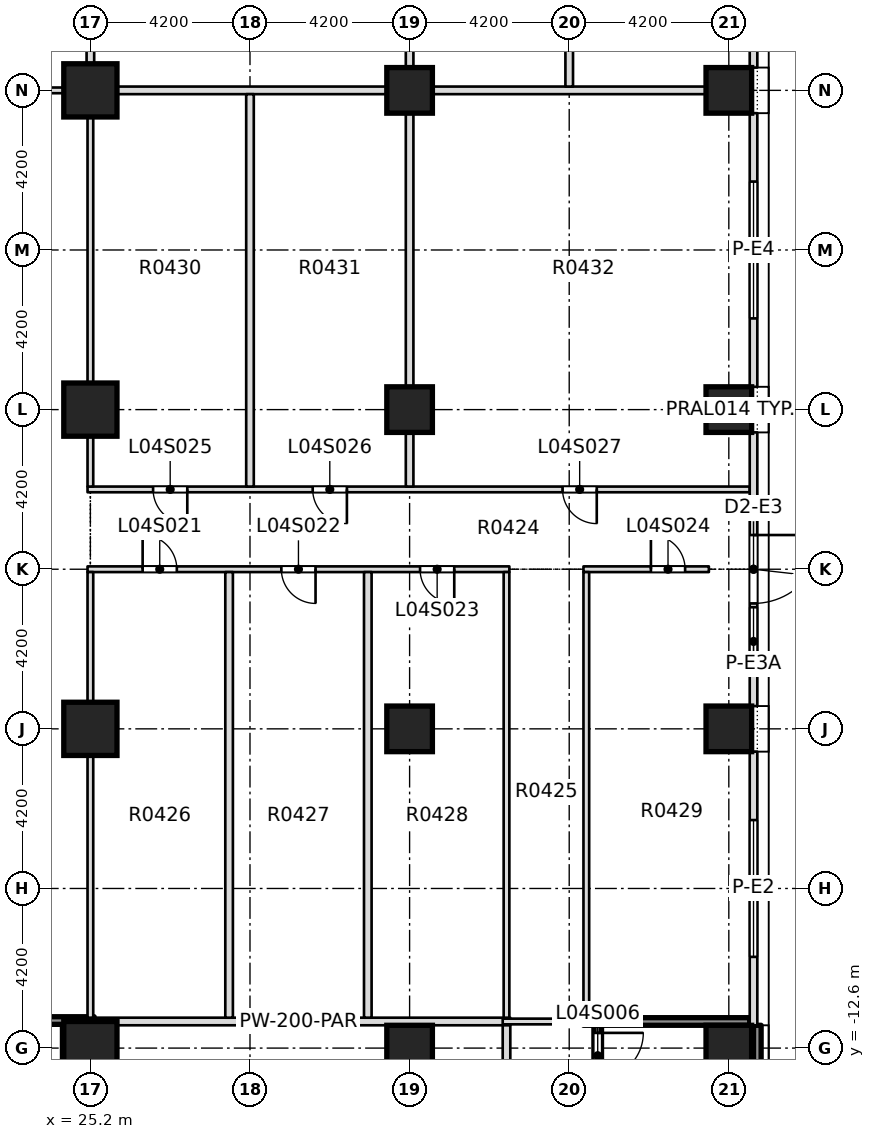
"""IFC4 building model, lengths in metres.
Left out: names, types, materials, properties, quantities, classifications, styles, units other than length and angle.
Written with IfcOpenShell. Run it as: python <this file> out.ifc"""

import sys

from ifc_helpers import new_model, si_unit, direction, frame, frame_2d, origin, origin_2d, place, context, subcontext, project, spatial, rectangle, extrude, element, fill, save


model = new_model("IFC4")
c1 = context("Model", 3, precision=1e-05, world=origin(), true_north=direction((0.0, 1.0)))
c2 = subcontext(c1, "Body", "Model", "MODEL_VIEW")
j1 = project(units=[si_unit("LENGTHUNIT", "METRE"), si_unit("PLANEANGLEUNIT", "RADIAN")], contexts=[c1])
p1 = place(None, origin())
s1 = spatial("IfcSite", under=j1, at=p1, CompositionType="ELEMENT")
p2 = place(p1, origin())
s2 = spatial("IfcBuilding", under=s1, at=p2, CompositionType="ELEMENT")
p3 = place(p2, frame((0.0, 0.0, 25.0)))
s3 = spatial("IfcBuildingStorey", under=s2, at=p3, CompositionType="ELEMENT", Elevation=25.0)
for number, where, z_axis, x_axis in (
    (1, (25.2, -12.6, -0.4), (0.0, 0.0, 1.0), (1.0, 0.0, 0.0)),
    (2, (25.2, -4.2, -0.4), (0.0, 0.0, 1.0), (1.0, 0.0, 0.0)),
    (3, (25.2, 4.2, -0.4), (0.0, 0.0, 1.0), (1.0, 0.0, 0.0)),
    (4, (25.2, 12.6, -0.4), (0.0, 0.0, 1.0), (1.0, 0.0, 0.0)),
):
    element("IfcColumn", number, at=place(p3, frame(where, z_axis=z_axis, x_axis=x_axis)), inside=s3, PredefinedType="COLUMN", context=c2, shape_type="SweptSolid", body=[
        extrude(rectangle(XDim=1.4, YDim=1.4, at=origin_2d()), origin(), (0.0, 0.0, 1.0), 5.0),
    ])
for number, where, z_axis, x_axis in (
    (5, (33.6, -12.6, 0.0), (0.0, 0.0, 1.0), (1.0, 0.0, 0.0)),
    (6, (42.0, -12.6, 0.0), (0.0, 0.0, 1.0), (1.0, 0.0, 0.0)),
    (7, (33.6, -4.2, 0.0), (0.0, 0.0, 1.0), (1.0, 0.0, 0.0)),
    (8, (42.0, -4.2, 0.0), (0.0, 0.0, 1.0), (1.0, 0.0, 0.0)),
    (9, (33.6, 4.2, 0.0), (0.0, 0.0, 1.0), (1.0, 0.0, 0.0)),
    (10, (42.0, 4.2, 0.0), (0.0, 0.0, 1.0), (1.0, 0.0, 0.0)),
    (11, (33.6, 12.6, 0.0), (0.0, 0.0, 1.0), (1.0, 0.0, 0.0)),
    (12, (42.0, 12.6, 0.0), (0.0, 0.0, 1.0), (1.0, 0.0, 0.0)),
):
    element("IfcColumn", number, at=place(p3, frame(where, z_axis=z_axis, x_axis=x_axis)), inside=s3, PredefinedType="COLUMN", context=c2, shape_type="SweptSolid", body=[
        extrude(rectangle(XDim=1.2, YDim=1.2, at=origin_2d()), origin(), (0.0, 0.0, 1.0), 5.0),
    ])
p4 = place(p3, frame((16.725, -11.875, 0.0), z_axis=(0.0, 0.0, 1.0), x_axis=(1.0, 0.0, 0.0)))
e13 = element("IfcWall", 13, at=p4, inside=s3, PredefinedType="SOLIDWALL", context=c2, shape_type="SweptSolid", body=[
    extrude(rectangle(XDim=8.575, YDim=0.2, at=frame_2d((4.288, 0.0))), origin(), (0.0, 0.0, 1.0), 4.6),
])
p5 = place(p3, frame((25.1, -11.9, 0.0), z_axis=(0.0, 0.0, 1.0), x_axis=(1.0, 0.0, 0.0)))
e14 = element("IfcWall", 14, at=p5, inside=s3, PredefinedType="PARTITIONING", context=c2, shape_type="SweptSolid", body=[
    extrude(rectangle(XDim=11.15, YDim=0.2, at=frame_2d((5.575, 0.0))), origin(), (0.0, 0.0, 1.0), 4.6),
])
p6 = place(p3, frame((36.05, -11.9, 0.0), z_axis=(0.0, 0.0, 1.0), x_axis=(1.0, 0.0, 0.0)))
e15 = element("IfcWall", 15, at=p6, inside=s3, PredefinedType="PARTITIONING", context=c2, shape_type="SweptSolid", body=[
    extrude(rectangle(XDim=2.275, YDim=0.15, at=frame_2d((1.137, 0.0))), origin(), (0.0, 0.0, 1.0), 4.6),
])
p7 = place(p3, frame((38.175, -11.9, 0.0), z_axis=(0.0, 0.0, 1.0), x_axis=(1.0, 0.0, 0.0)))
e16 = element("IfcWall", 16, at=p7, inside=s3, PredefinedType="SOLIDWALL", context=c2, shape_type="SweptSolid", body=[
    extrude(rectangle(XDim=4.375, YDim=0.2, at=frame_2d((2.188, 0.0))), origin(), (0.0, 0.0, 1.0), 4.6),
])
p8 = place(p3, frame((25.125, 0.0, 0.0), z_axis=(0.0, 0.0, 1.0), x_axis=(1.0, 0.0, 0.0)))
e17 = element("IfcWall", 17, at=p8, inside=s3, PredefinedType="PARTITIONING", context=c2, shape_type="SweptSolid", body=[
    extrude(rectangle(XDim=11.1, YDim=0.15, at=frame_2d((5.55, 0.0))), origin(), (0.0, 0.0, 1.0), 4.6),
])
p9 = place(p8, frame((1.45, 0.0, 0.0)))
e18 = element("IfcOpeningElement", 18, at=p9, cuts=e17, PredefinedType="OPENING", context=c2, shape_type="SweptSolid", body=[
    extrude(rectangle(XDim=0.9, YDim=2.1, at=frame_2d((0.45, 1.05))), frame((0.0, 0.085, 0.0), z_axis=(0.0, -1.0, 0.0), x_axis=(1.0, 0.0, 0.0)), (0.0, 0.0, 1.0), 0.17),
])
p10 = place(p8, frame((5.1, 0.0, 0.0)))
e19 = element("IfcOpeningElement", 19, at=p10, cuts=e17, PredefinedType="OPENING", context=c2, shape_type="SweptSolid", body=[
    extrude(rectangle(XDim=0.9, YDim=2.1, at=frame_2d((0.45, 1.05))), frame((0.0, 0.085, 0.0), z_axis=(0.0, -1.0, 0.0), x_axis=(1.0, 0.0, 0.0)), (0.0, 0.0, 1.0), 0.17),
])
p11 = place(p8, frame((8.75, 0.0, 0.0)))
e20 = element("IfcOpeningElement", 20, at=p11, cuts=e17, PredefinedType="OPENING", context=c2, shape_type="SweptSolid", body=[
    extrude(rectangle(XDim=0.9, YDim=2.1, at=frame_2d((0.45, 1.05))), frame((0.0, 0.085, 0.0), z_axis=(0.0, -1.0, 0.0), x_axis=(1.0, 0.0, 0.0)), (0.0, 0.0, 1.0), 0.17),
])
p12 = place(p3, frame((38.175, 0.0, 0.0), z_axis=(0.0, 0.0, 1.0), x_axis=(1.0, 0.0, 0.0)))
e21 = element("IfcWall", 21, at=p12, inside=s3, PredefinedType="PARTITIONING", context=c2, shape_type="SweptSolid", body=[
    extrude(rectangle(XDim=3.3, YDim=0.15, at=frame_2d((1.65, 0.0))), origin(), (0.0, 0.0, 1.0), 4.6),
])
p13 = place(p12, frame((1.775, 0.0, 0.0)))
e22 = element("IfcOpeningElement", 22, at=p13, cuts=e21, PredefinedType="OPENING", context=c2, shape_type="SweptSolid", body=[
    extrude(rectangle(XDim=0.9, YDim=2.1, at=frame_2d((0.45, 1.05))), frame((0.0, 0.085, 0.0), z_axis=(0.0, -1.0, 0.0), x_axis=(1.0, 0.0, 0.0)), (0.0, 0.0, 1.0), 0.17),
])
p14 = place(p3, frame((25.125, 2.1, 0.0), z_axis=(0.0, 0.0, 1.0), x_axis=(1.0, 0.0, 0.0)))
e23 = element("IfcWall", 23, at=p14, inside=s3, PredefinedType="PARTITIONING", context=c2, shape_type="SweptSolid", body=[
    extrude(rectangle(XDim=17.425, YDim=0.15, at=frame_2d((8.712, 0.0))), origin(), (0.0, 0.0, 1.0), 4.6),
])
p15 = place(p14, frame((1.725, 0.0, 0.0)))
e24 = element("IfcOpeningElement", 24, at=p15, cuts=e23, PredefinedType="OPENING", context=c2, shape_type="SweptSolid", body=[
    extrude(rectangle(XDim=0.9, YDim=2.1, at=frame_2d((0.45, 1.05))), frame((0.0, 0.085, 0.0), z_axis=(0.0, -1.0, 0.0), x_axis=(1.0, 0.0, 0.0)), (0.0, 0.0, 1.0), 0.17),
])
p16 = place(p14, frame((5.925, 0.0, 0.0)))
e25 = element("IfcOpeningElement", 25, at=p16, cuts=e23, PredefinedType="OPENING", context=c2, shape_type="SweptSolid", body=[
    extrude(rectangle(XDim=0.9, YDim=2.1, at=frame_2d((0.45, 1.05))), frame((0.0, 0.085, 0.0), z_axis=(0.0, -1.0, 0.0), x_axis=(1.0, 0.0, 0.0)), (0.0, 0.0, 1.0), 0.17),
])
p17 = place(p14, frame((12.5, 0.0, 0.0)))
e26 = element("IfcOpeningElement", 26, at=p17, cuts=e23, PredefinedType="OPENING", context=c2, shape_type="SweptSolid", body=[
    extrude(rectangle(XDim=0.9, YDim=2.1, at=frame_2d((0.45, 1.05))), frame((0.0, 0.085, 0.0), z_axis=(0.0, -1.0, 0.0), x_axis=(1.0, 0.0, 0.0)), (0.0, 0.0, 1.0), 0.17),
])
p18 = place(p3, frame((16.725, 12.6, 0.0), z_axis=(0.0, 0.0, 1.0), x_axis=(1.0, 0.0, 0.0)))
e27 = element("IfcWall", 27, at=p18, inside=s3, PredefinedType="PARTITIONING", context=c2, shape_type="SweptSolid", body=[
    extrude(rectangle(XDim=8.575, YDim=0.15, at=frame_2d((4.288, 0.0))), origin(), (0.0, 0.0, 1.0), 4.6),
])
p19 = place(p3, frame((25.1, 12.6, 0.0), z_axis=(0.0, 0.0, 1.0), x_axis=(1.0, 0.0, 0.0)))
e28 = element("IfcWall", 28, at=p19, inside=s3, PredefinedType="PARTITIONING", context=c2, shape_type="SweptSolid", body=[
    extrude(rectangle(XDim=17.45, YDim=0.2, at=frame_2d((8.725, 0.0))), origin(), (0.0, 0.0, 1.0), 4.6),
])
p20 = place(p3, frame((25.2, -18.125, 0.0), z_axis=(0.0, 0.0, 1.0), x_axis=(0.0, 1.0, 0.0)))
e29 = element("IfcWall", 29, at=p20, inside=s3, PredefinedType="SOLIDWALL", context=c2, shape_type="SweptSolid", body=[
    extrude(rectangle(XDim=6.125, YDim=0.2, at=frame_2d((3.062, 0.0))), origin(), (0.0, 0.0, 1.0), 4.6),
])
p21 = place(p3, frame((25.2, -11.8, 0.0), z_axis=(0.0, 0.0, 1.0), x_axis=(0.0, 1.0, 0.0)))
e30 = element("IfcWall", 30, at=p21, inside=s3, PredefinedType="PARTITIONING", context=c2, shape_type="SweptSolid", body=[
    extrude(rectangle(XDim=11.725, YDim=0.15, at=frame_2d((5.863, 0.0))), origin(), (0.0, 0.0, 1.0), 4.6),
])
p22 = place(p3, frame((25.2, 2.175, 0.0), z_axis=(0.0, 0.0, 1.0), x_axis=(0.0, 1.0, 0.0)))
e31 = element("IfcWall", 31, at=p22, inside=s3, PredefinedType="PARTITIONING", context=c2, shape_type="SweptSolid", body=[
    extrude(rectangle(XDim=10.325, YDim=0.15, at=frame_2d((5.163, 0.0))), origin(), (0.0, 0.0, 1.0), 4.6),
])
p23 = place(p3, frame((25.2, 12.7, 0.0), z_axis=(0.0, 0.0, 1.0), x_axis=(0.0, 1.0, 0.0)))
e32 = element("IfcWall", 32, at=p23, inside=s3, PredefinedType="PARTITIONING", context=c2, shape_type="SweptSolid", body=[
    extrude(rectangle(XDim=8.975, YDim=0.2, at=frame_2d((4.488, 0.0))), origin(), (0.0, 0.0, 1.0), 4.6),
])
p24 = place(p3, frame((28.85, -11.8, 0.0), z_axis=(0.0, 0.0, 1.0), x_axis=(0.0, 1.0, 0.0)))
e33 = element("IfcWall", 33, at=p24, inside=s3, PredefinedType="PARTITIONING", context=c2, shape_type="SweptSolid", body=[
    extrude(rectangle(XDim=11.725, YDim=0.2, at=frame_2d((5.863, 0.0))), origin(), (0.0, 0.0, 1.0), 4.6),
])
p25 = place(p3, frame((29.4, 2.175, 0.0), z_axis=(0.0, 0.0, 1.0), x_axis=(0.0, 1.0, 0.0)))
e34 = element("IfcWall", 34, at=p25, inside=s3, PredefinedType="PARTITIONING", context=c2, shape_type="SweptSolid", body=[
    extrude(rectangle(XDim=10.325, YDim=0.2, at=frame_2d((5.163, 0.0))), origin(), (0.0, 0.0, 1.0), 4.6),
])
p26 = place(p3, frame((32.5, -11.8, 0.0), z_axis=(0.0, 0.0, 1.0), x_axis=(0.0, 1.0, 0.0)))
e35 = element("IfcWall", 35, at=p26, inside=s3, PredefinedType="PARTITIONING", context=c2, shape_type="SweptSolid", body=[
    extrude(rectangle(XDim=11.725, YDim=0.2, at=frame_2d((5.863, 0.0))), origin(), (0.0, 0.0, 1.0), 4.6),
])
p27 = place(p3, frame((33.6, 2.175, 0.0), z_axis=(0.0, 0.0, 1.0), x_axis=(0.0, 1.0, 0.0)))
e36 = element("IfcWall", 36, at=p27, inside=s3, PredefinedType="PARTITIONING", context=c2, shape_type="SweptSolid", body=[
    extrude(rectangle(XDim=19.05, YDim=0.2, at=frame_2d((9.525, 0.0))), origin(), (0.0, 0.0, 1.0), 4.6),
])
p28 = place(p3, frame((36.15, -18.125, 0.0), z_axis=(0.0, 0.0, 1.0), x_axis=(0.0, 1.0, 0.0)))
e37 = element("IfcWall", 37, at=p28, inside=s3, PredefinedType="PARTITIONING", context=c2, shape_type="SweptSolid", body=[
    extrude(rectangle(XDim=6.125, YDim=0.2, at=frame_2d((3.062, 0.0))), origin(), (0.0, 0.0, 1.0), 4.6),
])
p29 = place(p3, frame((36.15, -11.8, 0.0), z_axis=(0.0, 0.0, 1.0), x_axis=(0.0, 1.0, 0.0)))
e38 = element("IfcWall", 38, at=p29, inside=s3, PredefinedType="PARTITIONING", context=c2, shape_type="SweptSolid", body=[
    extrude(rectangle(XDim=11.725, YDim=0.15, at=frame_2d((5.863, 0.0))), origin(), (0.0, 0.0, 1.0), 4.6),
])
p30 = place(p3, frame((37.8, 12.7, 0.0), z_axis=(0.0, 0.0, 1.0), x_axis=(0.0, 1.0, 0.0)))
e39 = element("IfcWall", 39, at=p30, inside=s3, PredefinedType="PARTITIONING", context=c2, shape_type="SweptSolid", body=[
    extrude(rectangle(XDim=8.525, YDim=0.2, at=frame_2d((4.263, 0.0))), origin(), (0.0, 0.0, 1.0), 4.6),
])
p31 = place(p3, frame((38.25, -11.8, 0.0), z_axis=(0.0, 0.0, 1.0), x_axis=(0.0, 1.0, 0.0)))
e40 = element("IfcWall", 40, at=p31, inside=s3, PredefinedType="PARTITIONING", context=c2, shape_type="SweptSolid", body=[
    extrude(rectangle(XDim=11.725, YDim=0.15, at=frame_2d((5.863, 0.0))), origin(), (0.0, 0.0, 1.0), 4.6),
])
p32 = place(p3, frame((38.55, -19.125, 0.0), z_axis=(0.0, 0.0, 1.0), x_axis=(0.0, 1.0, 0.0)))
e41 = element("IfcWall", 41, at=p32, inside=s3, PredefinedType="SOLIDWALL", context=c2, shape_type="SweptSolid", body=[
    extrude(rectangle(XDim=7.125, YDim=0.2, at=frame_2d((3.562, 0.0))), origin(), (0.0, 0.0, 1.0), 4.6),
])
p33 = place(p32, frame((5.725, 0.0, 0.0)))
e42 = element("IfcOpeningElement", 42, at=p33, cuts=e41, PredefinedType="OPENING", context=c2, shape_type="SweptSolid", body=[
    extrude(rectangle(XDim=1.2, YDim=2.1, at=frame_2d((0.6, 1.05))), frame((0.0, 0.11, 0.0), z_axis=(0.0, -1.0, 0.0), x_axis=(1.0, 0.0, 0.0)), (0.0, 0.0, 1.0), 0.22),
])
p34 = place(p3, frame((42.65, -12.0, 0.0), z_axis=(0.0, 0.0, 1.0), x_axis=(0.0, 1.0, 0.0)))
e43 = element("IfcWall", 43, at=p34, inside=s3, PredefinedType="STANDARD", context=c2, shape_type="SweptSolid", body=[
    extrude(rectangle(XDim=7.2, YDim=0.2, at=frame_2d((3.6, 0.0))), origin(), (0.0, 0.0, 1.0), 4.6),
])
p35 = place(p34, frame((1.8, 0.0, 0.9)))
e44 = element("IfcOpeningElement", 44, at=p35, cuts=e43, PredefinedType="OPENING", context=c2, shape_type="SweptSolid", body=[
    extrude(rectangle(XDim=3.6, YDim=2.8, at=frame_2d((1.8, 1.4))), frame((0.0, 0.11, 0.0), z_axis=(0.0, -1.0, 0.0), x_axis=(1.0, 0.0, 0.0)), (0.0, 0.0, 1.0), 0.22),
])
p36 = place(p3, frame((42.65, -3.6, 0.0), z_axis=(0.0, 0.0, 1.0), x_axis=(0.0, 1.0, 0.0)))
e45 = element("IfcWall", 45, at=p36, inside=s3, PredefinedType="STANDARD", context=c2, shape_type="SweptSolid", body=[
    extrude(rectangle(XDim=7.2, YDim=0.2, at=frame_2d((3.6, 0.0))), origin(), (0.0, 0.0, 1.0), 4.6),
])
p37 = place(p36, frame((0.8, 0.0, 0.9)))
e46 = element("IfcOpeningElement", 46, at=p37, cuts=e45, PredefinedType="OPENING", context=c2, shape_type="SweptSolid", body=[
    extrude(rectangle(XDim=1.8, YDim=2.8, at=frame_2d((0.9, 1.4))), frame((0.0, 0.11, 0.0), z_axis=(0.0, -1.0, 0.0), x_axis=(1.0, 0.0, 0.0)), (0.0, 0.0, 1.0), 0.22),
])
p38 = place(p36, frame((2.7, 0.0, 0.0)))
e47 = element("IfcOpeningElement", 47, at=p38, cuts=e45, PredefinedType="OPENING", context=c2, shape_type="SweptSolid", body=[
    extrude(rectangle(XDim=1.8, YDim=2.4, at=frame_2d((0.9, 1.2))), frame((0.0, 0.11, 0.0), z_axis=(0.0, -1.0, 0.0), x_axis=(1.0, 0.0, 0.0)), (0.0, 0.0, 1.0), 0.22),
])
p39 = place(p3, frame((42.65, 4.8, 0.0), z_axis=(0.0, 0.0, 1.0), x_axis=(0.0, 1.0, 0.0)))
e48 = element("IfcWall", 48, at=p39, inside=s3, PredefinedType="STANDARD", context=c2, shape_type="SweptSolid", body=[
    extrude(rectangle(XDim=7.2, YDim=0.2, at=frame_2d((3.6, 0.0))), origin(), (0.0, 0.0, 1.0), 4.6),
])
p40 = place(p39, frame((1.8, 0.0, 0.9)))
e49 = element("IfcOpeningElement", 49, at=p40, cuts=e48, PredefinedType="OPENING", context=c2, shape_type="SweptSolid", body=[
    extrude(rectangle(XDim=3.6, YDim=2.8, at=frame_2d((1.8, 1.4))), frame((0.0, 0.11, 0.0), z_axis=(0.0, -1.0, 0.0), x_axis=(1.0, 0.0, 0.0)), (0.0, 0.0, 1.0), 0.22),
])
p41 = place(p3, frame((42.65, 13.2, 0.0), z_axis=(0.0, 0.0, 1.0), x_axis=(0.0, 1.0, 0.0)))
e50 = element("IfcWall", 50, at=p41, inside=s3, PredefinedType="STANDARD", context=c2, shape_type="SweptSolid", body=[
    extrude(rectangle(XDim=7.2, YDim=0.2, at=frame_2d((3.6, 0.0))), origin(), (0.0, 0.0, 1.0), 4.6),
])
p42 = place(p41, frame((0.8, 0.0, 0.9)))
e51 = element("IfcOpeningElement", 51, at=p42, cuts=e50, PredefinedType="OPENING", context=c2, shape_type="SweptSolid", body=[
    extrude(rectangle(XDim=1.8, YDim=2.8, at=frame_2d((0.9, 1.4))), frame((0.0, 0.11, 0.0), z_axis=(0.0, -1.0, 0.0), x_axis=(1.0, 0.0, 0.0)), (0.0, 0.0, 1.0), 0.22),
])
p43 = place(p41, frame((2.7, 0.0, 0.0)))
e52 = element("IfcOpeningElement", 52, at=p43, cuts=e50, PredefinedType="OPENING", context=c2, shape_type="SweptSolid", body=[
    extrude(rectangle(XDim=1.8, YDim=2.4, at=frame_2d((0.9, 1.2))), frame((0.0, 0.11, 0.0), z_axis=(0.0, -1.0, 0.0), x_axis=(1.0, 0.0, 0.0)), (0.0, 0.0, 1.0), 0.22),
])
p44 = place(p41, frame((4.6, 0.0, 0.9)))
e53 = element("IfcOpeningElement", 53, at=p44, cuts=e50, PredefinedType="OPENING", context=c2, shape_type="SweptSolid", body=[
    extrude(rectangle(XDim=1.8, YDim=2.8, at=frame_2d((0.9, 1.4))), frame((0.0, 0.11, 0.0), z_axis=(0.0, -1.0, 0.0), x_axis=(1.0, 0.0, 0.0)), (0.0, 0.0, 1.0), 0.22),
])
p45 = place(p3, frame((42.75, -13.2, 0.0), z_axis=(0.0, 0.0, 1.0), x_axis=(0.0, 1.0, 0.0)))
e54 = element("IfcWall", 54, at=p45, inside=s3, PredefinedType="SOLIDWALL", context=c2, shape_type="SweptSolid", body=[
    extrude(rectangle(XDim=1.2, YDim=0.2, at=frame_2d((0.6, 0.0))), origin(), (0.0, 0.0, 1.0), 4.6),
])
p46 = place(p33, origin())
e55 = element("IfcDoor", 55, at=p46, inside=s3, OperationType="DOUBLE_DOOR_SINGLE_SWING", PredefinedType="DOOR", context=c2, shape_type="SweptSolid", body=[
    extrude(rectangle(XDim=1.2, YDim=2.1, at=frame_2d((0.6, 1.05))), frame((0.0, 0.025, 0.0), z_axis=(0.0, -1.0, 0.0), x_axis=(1.0, 0.0, 0.0)), (0.0, 0.0, 1.0), 0.05),
])
fill(e42, e55)
p47 = place(p9, origin())
e56 = element("IfcDoor", 56, at=p47, inside=s3, OperationType="SINGLE_SWING_RIGHT", PredefinedType="DOOR", context=c2, shape_type="SweptSolid", body=[
    extrude(rectangle(XDim=0.9, YDim=2.1, at=frame_2d((0.45, 1.05))), frame((0.0, 0.025, 0.0), z_axis=(0.0, -1.0, 0.0), x_axis=(1.0, 0.0, 0.0)), (0.0, 0.0, 1.0), 0.05),
])
fill(e18, e56)
p48 = place(p10, origin())
e57 = element("IfcDoor", 57, at=p48, inside=s3, OperationType="SINGLE_SWING_LEFT", PredefinedType="DOOR", context=c2, shape_type="SweptSolid", body=[
    extrude(rectangle(XDim=0.9, YDim=2.1, at=frame_2d((0.45, 1.05))), frame((0.0, 0.025, 0.0), z_axis=(0.0, -1.0, 0.0), x_axis=(1.0, 0.0, 0.0)), (0.0, 0.0, 1.0), 0.05),
])
fill(e19, e57)
p49 = place(p11, origin())
e58 = element("IfcDoor", 58, at=p49, inside=s3, OperationType="SINGLE_SWING_LEFT", PredefinedType="DOOR", context=c2, shape_type="SweptSolid", body=[
    extrude(rectangle(XDim=0.9, YDim=2.1, at=frame_2d((0.45, 1.05))), frame((0.0, 0.025, 0.0), z_axis=(0.0, -1.0, 0.0), x_axis=(1.0, 0.0, 0.0)), (0.0, 0.0, 1.0), 0.05),
])
fill(e20, e58)
p50 = place(p13, origin())
e59 = element("IfcDoor", 59, at=p50, inside=s3, OperationType="SINGLE_SWING_LEFT", PredefinedType="DOOR", context=c2, shape_type="SweptSolid", body=[
    extrude(rectangle(XDim=0.9, YDim=2.1, at=frame_2d((0.45, 1.05))), frame((0.0, 0.025, 0.0), z_axis=(0.0, -1.0, 0.0), x_axis=(1.0, 0.0, 0.0)), (0.0, 0.0, 1.0), 0.05),
])
fill(e22, e59)
p51 = place(p15, origin())
e60 = element("IfcDoor", 60, at=p51, inside=s3, OperationType="SINGLE_SWING_RIGHT", PredefinedType="DOOR", context=c2, shape_type="SweptSolid", body=[
    extrude(rectangle(XDim=0.9, YDim=2.1, at=frame_2d((0.45, 1.05))), frame((0.0, 0.025, 0.0), z_axis=(0.0, -1.0, 0.0), x_axis=(1.0, 0.0, 0.0)), (0.0, 0.0, 1.0), 0.05),
])
fill(e24, e60)
p52 = place(p16, origin())
e61 = element("IfcDoor", 61, at=p52, inside=s3, OperationType="SINGLE_SWING_RIGHT", PredefinedType="DOOR", context=c2, shape_type="SweptSolid", body=[
    extrude(rectangle(XDim=0.9, YDim=2.1, at=frame_2d((0.45, 1.05))), frame((0.0, 0.025, 0.0), z_axis=(0.0, -1.0, 0.0), x_axis=(1.0, 0.0, 0.0)), (0.0, 0.0, 1.0), 0.05),
])
fill(e25, e61)
p53 = place(p17, origin())
e62 = element("IfcDoor", 62, at=p53, inside=s3, OperationType="SINGLE_SWING_LEFT", PredefinedType="DOOR", context=c2, shape_type="SweptSolid", body=[
    extrude(rectangle(XDim=0.9, YDim=2.1, at=frame_2d((0.45, 1.05))), frame((0.0, 0.025, 0.0), z_axis=(0.0, -1.0, 0.0), x_axis=(1.0, 0.0, 0.0)), (0.0, 0.0, 1.0), 0.05),
])
fill(e26, e62)
p54 = place(p35, origin())
e63 = element("IfcWindow", 63, at=p54, inside=s3, PartitioningType="SINGLE_PANEL", PredefinedType="WINDOW", context=c2, shape_type="SweptSolid", body=[
    extrude(rectangle(XDim=3.6, YDim=2.8, at=frame_2d((1.8, 1.4))), frame((0.0, 0.03, 0.0), z_axis=(0.0, -1.0, 0.0), x_axis=(1.0, 0.0, 0.0)), (0.0, 0.0, 1.0), 0.06),
])
fill(e44, e63)
p55 = place(p37, origin())
e64 = element("IfcWindow", 64, at=p55, inside=s3, PartitioningType="SINGLE_PANEL", PredefinedType="WINDOW", context=c2, shape_type="SweptSolid", body=[
    extrude(rectangle(XDim=1.8, YDim=2.8, at=frame_2d((0.9, 1.4))), frame((0.0, 0.03, 0.0), z_axis=(0.0, -1.0, 0.0), x_axis=(1.0, 0.0, 0.0)), (0.0, 0.0, 1.0), 0.06),
])
fill(e46, e64)
p56 = place(p38, origin())
e65 = element("IfcDoor", 65, at=p56, inside=s3, OperationType="SINGLE_SWING_LEFT", PredefinedType="DOOR", context=c2, shape_type="SweptSolid", body=[
    extrude(rectangle(XDim=1.8, YDim=2.4, at=frame_2d((0.9, 1.2))), frame((0.0, 0.025, 0.0), z_axis=(0.0, -1.0, 0.0), x_axis=(1.0, 0.0, 0.0)), (0.0, 0.0, 1.0), 0.05),
])
fill(e47, e65)
p57 = place(p40, origin())
e66 = element("IfcWindow", 66, at=p57, inside=s3, PartitioningType="SINGLE_PANEL", PredefinedType="WINDOW", context=c2, shape_type="SweptSolid", body=[
    extrude(rectangle(XDim=3.6, YDim=2.8, at=frame_2d((1.8, 1.4))), frame((0.0, 0.03, 0.0), z_axis=(0.0, -1.0, 0.0), x_axis=(1.0, 0.0, 0.0)), (0.0, 0.0, 1.0), 0.06),
])
fill(e49, e66)
save(model, sys.argv[1])
